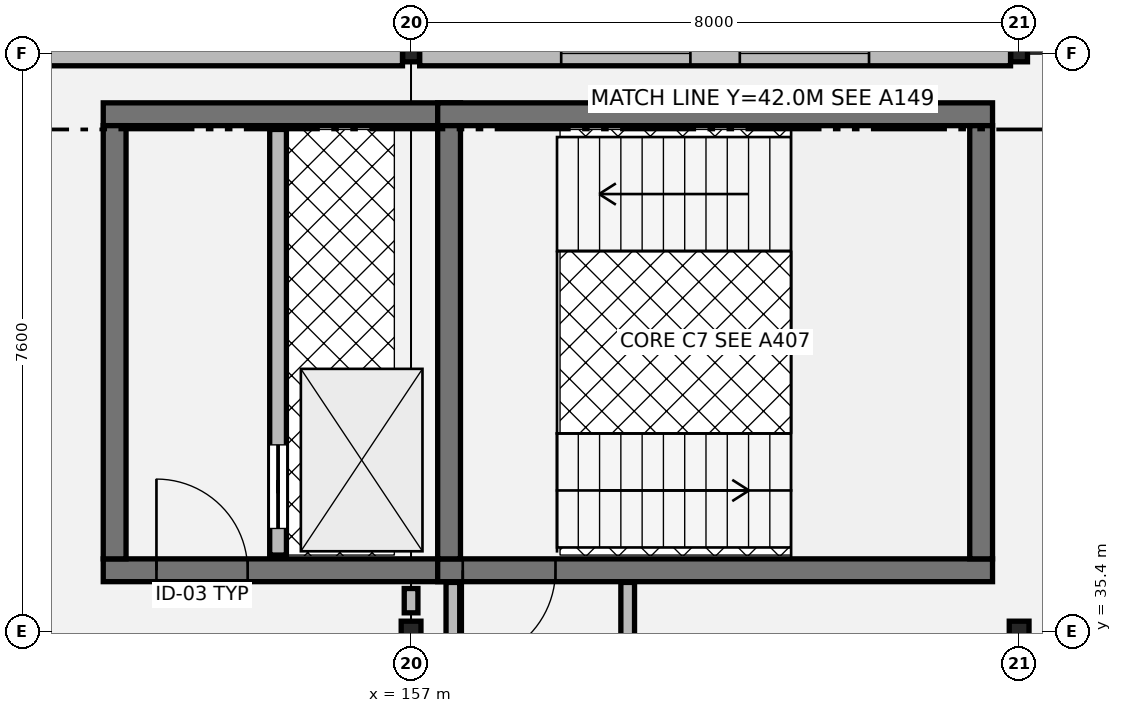
"""IFC4 building model, lengths in metres.
Left out: names, types, materials, properties, quantities, classifications, styles, units other than length and angle.
Written with IfcOpenShell. Run it as: python <this file> out.ifc"""

import sys

from ifc_helpers import new_model, si_unit, direction, frame, frame_2d, origin, origin_2d, place, context, subcontext, project, spatial, rectangle, hollow_rectangle, i_section, extrude, element, fill, save


model = new_model("IFC4")
c1 = context("Model", 3, precision=1e-05, world=origin(), true_north=direction((0.0, 1.0)))
c2 = subcontext(c1, "Body", "Model", "MODEL_VIEW")
j1 = project(units=[si_unit("LENGTHUNIT", "METRE"), si_unit("PLANEANGLEUNIT", "RADIAN")], contexts=[c1])
p1 = place(None, origin())
s1 = spatial("IfcSite", under=j1, at=p1, CompositionType="ELEMENT")
p2 = place(p1, origin())
s2 = spatial("IfcBuilding", under=s1, at=p2, CompositionType="ELEMENT")
p3 = place(p2, frame((0.0, 0.0, 13.26)))
s3 = spatial("IfcBuildingStorey", under=s2, at=p3, CompositionType="ELEMENT", Elevation=13.26)
p4 = place(p3, frame((157.0, 35.4, 0.0), z_axis=(0.0, 0.0, 1.0), x_axis=(1.0, 0.0, 0.0)))
e1 = element("IfcColumn", 1, at=p4, inside=s3, PredefinedType="COLUMN", context=c2, shape_type="SweptSolid", body=[
    extrude(i_section(OverallWidth=0.26, OverallDepth=0.26, WebThickness=0.01, FlangeThickness=0.018, at=origin_2d()), origin(), (0.0, 0.0, 1.0), 4.055),
])
p5 = place(p3, frame((157.0, 43.0, 0.0), z_axis=(0.0, 0.0, 1.0), x_axis=(1.0, 0.0, 0.0)))
e2 = element("IfcColumn", 2, at=p5, inside=s3, PredefinedType="COLUMN", context=c2, shape_type="SweptSolid", body=[
    extrude(hollow_rectangle(XDim=0.22, YDim=0.22, WallThickness=0.01, at=origin_2d()), origin(), (0.0, 0.0, 1.0), 4.055),
])
p6 = place(p3, frame((165.0, 35.4, 0.0), z_axis=(0.0, 0.0, 1.0), x_axis=(1.0, 0.0, 0.0)))
e3 = element("IfcColumn", 3, at=p6, inside=s3, PredefinedType="COLUMN", context=c2, shape_type="SweptSolid", body=[
    extrude(i_section(OverallWidth=0.26, OverallDepth=0.26, WebThickness=0.01, FlangeThickness=0.018, at=origin_2d()), origin(), (0.0, 0.0, 1.0), 4.055),
])
p7 = place(p3, frame((165.0, 43.0, 0.0), z_axis=(0.0, 0.0, 1.0), x_axis=(1.0, 0.0, 0.0)))
e4 = element("IfcColumn", 4, at=p7, inside=s3, PredefinedType="COLUMN", context=c2, shape_type="SweptSolid", body=[
    extrude(hollow_rectangle(XDim=0.22, YDim=0.22, WallThickness=0.01, at=origin_2d()), origin(), (0.0, 0.0, 1.0), 4.055),
])
p8 = place(p3, frame((164.887, 43.0, 0.0), z_axis=(0.0, 0.0, 1.0), x_axis=(-1.0, 0.0, 0.0)))
e5 = element("IfcWall", 5, at=p8, inside=s3, PredefinedType="SOLIDWALL", context=c2, shape_type="SweptSolid", body=[
    extrude(rectangle(XDim=7.774, YDim=0.325, at=frame_2d((3.887, 0.0))), origin(), (0.0, 0.0, 1.0), 3.48),
])
p9 = place(p8, frame((1.862, 0.0, 0.8)))
e6 = element("IfcOpeningElement", 6, at=p9, cuts=e5, PredefinedType="OPENING", context=c2, shape_type="SweptSolid", body=[
    extrude(rectangle(XDim=1.7, YDim=2.2, at=frame_2d((0.85, 1.1))), frame((0.0, 0.172, 0.0), z_axis=(0.0, -1.0, 0.0), x_axis=(1.0, 0.0, 0.0)), (0.0, 0.0, 1.0), 0.345),
])
p10 = place(p8, frame((4.212, 0.0, 0.8)))
e7 = element("IfcOpeningElement", 7, at=p10, cuts=e5, PredefinedType="OPENING", context=c2, shape_type="SweptSolid", body=[
    extrude(rectangle(XDim=1.7, YDim=2.2, at=frame_2d((0.85, 1.1))), frame((0.0, 0.172, 0.0), z_axis=(0.0, -1.0, 0.0), x_axis=(1.0, 0.0, 0.0)), (0.0, 0.0, 1.0), 0.345),
])
p11 = place(p3, frame((156.887, 43.0, 0.0), z_axis=(0.0, 0.0, 1.0), x_axis=(-1.0, 0.0, 0.0)))
e8 = element("IfcWall", 8, at=p11, inside=s3, PredefinedType="SOLIDWALL", context=c2, shape_type="SweptSolid", body=[
    extrude(rectangle(XDim=7.774, YDim=0.325, at=frame_2d((3.887, 0.0))), origin(), (0.0, 0.0, 1.0), 3.48),
])
p12 = place(p3, frame((152.95, 36.2, 0.0), z_axis=(0.0, 0.0, 1.0), x_axis=(1.0, 0.0, 0.0)))
e9 = element("IfcWall", 9, at=p12, inside=s3, PredefinedType="SHEAR", context=c2, shape_type="SweptSolid", body=[
    extrude(rectangle(XDim=4.7, YDim=0.3, at=frame_2d((2.35, 0.0))), origin(), (0.0, 0.0, 1.0), 3.845),
])
p13 = place(p12, frame((0.7, 0.0, 0.0)))
e10 = element("IfcOpeningElement", 10, at=p13, cuts=e9, PredefinedType="OPENING", context=c2, shape_type="SweptSolid", body=[
    extrude(rectangle(XDim=1.2, YDim=2.16, at=frame_2d((0.6, 1.08))), frame((0.0, 0.16, 0.0), z_axis=(0.0, -1.0, 0.0), x_axis=(1.0, 0.0, 0.0)), (0.0, 0.0, 1.0), 0.32),
])
p14 = place(p3, frame((157.65, 42.2, 0.0), z_axis=(0.0, 0.0, 1.0), x_axis=(-1.0, 0.0, 0.0)))
e11 = element("IfcWall", 11, at=p14, inside=s3, PredefinedType="SHEAR", context=c2, shape_type="SweptSolid", body=[
    extrude(rectangle(XDim=4.7, YDim=0.3, at=frame_2d((2.35, 0.0))), origin(), (0.0, 0.0, 1.0), 3.845),
])
p15 = place(p3, frame((153.1, 42.05, 0.0), z_axis=(0.0, 0.0, 1.0), x_axis=(0.0, -1.0, 0.0)))
e12 = element("IfcWall", 12, at=p15, inside=s3, PredefinedType="SHEAR", context=c2, shape_type="SweptSolid", body=[
    extrude(rectangle(XDim=5.7, YDim=0.3, at=frame_2d((2.85, 0.0))), origin(), (0.0, 0.0, 1.0), 3.845),
])
p16 = place(p3, frame((155.25, 36.4, 0.0), z_axis=(0.0, 0.0, 1.0), x_axis=(0.0, 1.0, 0.0)))
e13 = element("IfcWall", 13, at=p16, inside=s3, PredefinedType="SOLIDWALL", context=c2, shape_type="SweptSolid", body=[
    extrude(rectangle(XDim=5.6, YDim=0.22, at=frame_2d((2.8, 0.0))), origin(), (0.0, 0.0, 1.0), 3.845),
])
p17 = place(p16, frame((0.35, 0.0, 0.0)))
e14 = element("IfcOpeningElement", 14, at=p17, cuts=e13, PredefinedType="OPENING", context=c2, shape_type="SweptSolid", body=[
    extrude(rectangle(XDim=1.1, YDim=2.15, at=frame_2d((0.55, 1.075))), frame((0.0, 0.12, 0.0), z_axis=(0.0, -1.0, 0.0), x_axis=(1.0, 0.0, 0.0)), (0.0, 0.0, 1.0), 0.24),
])
p18 = place(p3, frame((157.35, 36.2, 0.0), z_axis=(0.0, 0.0, 1.0), x_axis=(1.0, 0.0, 0.0)))
e15 = element("IfcWall", 15, at=p18, inside=s3, PredefinedType="SHEAR", context=c2, shape_type="SweptSolid", body=[
    extrude(rectangle(XDim=7.3, YDim=0.3, at=frame_2d((3.65, 0.0))), origin(), (0.0, 0.0, 1.0), 3.845),
])
p19 = place(p18, frame((0.33, 0.0, 0.0)))
e16 = element("IfcOpeningElement", 16, at=p19, cuts=e15, PredefinedType="OPENING", context=c2, shape_type="SweptSolid", body=[
    extrude(rectangle(XDim=1.22, YDim=2.18, at=frame_2d((0.61, 1.09))), frame((0.0, 0.16, 0.0), z_axis=(0.0, -1.0, 0.0), x_axis=(1.0, 0.0, 0.0)), (0.0, 0.0, 1.0), 0.32),
])
p20 = place(p3, frame((157.35, 42.2, 0.0), z_axis=(0.0, 0.0, 1.0), x_axis=(1.0, 0.0, 0.0)))
e17 = element("IfcWall", 17, at=p20, inside=s3, PredefinedType="SHEAR", context=c2, shape_type="SweptSolid", body=[
    extrude(rectangle(XDim=7.3, YDim=0.3, at=frame_2d((3.65, 0.0))), origin(), (0.0, 0.0, 1.0), 3.845),
])
for number, where, z_axis, x_axis in (
    (18, (157.5, 36.35, 0.0), (0.0, 0.0, 1.0), (0.0, 1.0, 0.0)),
    (19, (164.5, 36.35, 0.0), (0.0, 0.0, 1.0), (0.0, 1.0, 0.0)),
):
    element("IfcWall", number, at=place(p3, frame(where, z_axis=z_axis, x_axis=x_axis)), inside=s3, PredefinedType="SHEAR", context=c2, shape_type="SweptSolid", body=[
        extrude(rectangle(XDim=5.7, YDim=0.3, at=frame_2d((2.85, 0.0))), origin(), (0.0, 0.0, 1.0), 3.845),
    ])
p21 = place(p3, frame((157.0, 35.64, 0.0), z_axis=(0.0, 0.0, 1.0), x_axis=(0.0, 1.0, 0.0)))
e20 = element("IfcWall", 20, at=p21, inside=s3, PredefinedType="PARTITIONING", context=c2, shape_type="SweptSolid", body=[
    extrude(rectangle(XDim=0.32, YDim=0.18, at=frame_2d((0.16, 0.0))), origin(), (0.0, 0.0, 1.0), 3.18),
])
for number, where, z_axis, x_axis in (
    (21, (157.55, 11.96, 0.0), (0.0, 0.0, 1.0), (0.0, 1.0, 0.0)),
    (22, (159.85, 11.96, 0.0), (0.0, 0.0, 1.0), (0.0, 1.0, 0.0)),
):
    element("IfcWall", number, at=place(p3, frame(where, z_axis=z_axis, x_axis=x_axis)), inside=s3, PredefinedType="PARTITIONING", context=c2, shape_type="SweptSolid", body=[
        extrude(rectangle(XDim=24.08, YDim=0.18, at=frame_2d((12.04, 0.0))), origin(), (0.0, 0.0, 1.0), 3.18),
    ])
p22 = place(p9, origin())
e23 = element("IfcWindow", 23, at=p22, inside=s3, PartitioningType="SINGLE_PANEL", PredefinedType="WINDOW", context=c2, shape_type="SweptSolid", body=[
    extrude(rectangle(XDim=1.7, YDim=2.2, at=frame_2d((0.85, 1.1))), frame((0.0, 0.03, 0.0), z_axis=(0.0, -1.0, 0.0), x_axis=(1.0, 0.0, 0.0)), (0.0, 0.0, 1.0), 0.06),
])
fill(e6, e23)
p23 = place(p10, origin())
e24 = element("IfcWindow", 24, at=p23, inside=s3, PartitioningType="SINGLE_PANEL", PredefinedType="WINDOW", context=c2, shape_type="SweptSolid", body=[
    extrude(rectangle(XDim=1.7, YDim=2.2, at=frame_2d((0.85, 1.1))), frame((0.0, 0.03, 0.0), z_axis=(0.0, -1.0, 0.0), x_axis=(1.0, 0.0, 0.0)), (0.0, 0.0, 1.0), 0.06),
])
fill(e7, e24)
p24 = place(p13, origin())
e25 = element("IfcDoor", 25, at=p24, inside=s3, OperationType="SINGLE_SWING_LEFT", PredefinedType="DOOR", context=c2, shape_type="SweptSolid", body=[
    extrude(rectangle(XDim=1.2, YDim=2.16, at=frame_2d((0.6, 1.08))), frame((0.0, 0.025, 0.0), z_axis=(0.0, -1.0, 0.0), x_axis=(1.0, 0.0, 0.0)), (0.0, 0.0, 1.0), 0.05),
])
fill(e10, e25)
p25 = place(p17, origin())
e26 = element("IfcDoor", 26, at=p25, inside=s3, OperationType="SLIDING_TO_LEFT", PredefinedType="DOOR", context=c2, shape_type="SweptSolid", body=[
    extrude(rectangle(XDim=1.1, YDim=2.15, at=frame_2d((0.55, 1.075))), frame((0.0, 0.025, 0.0), z_axis=(0.0, -1.0, 0.0), x_axis=(1.0, 0.0, 0.0)), (0.0, 0.0, 1.0), 0.05),
])
fill(e14, e26)
p26 = place(p19, origin())
e27 = element("IfcDoor", 27, at=p26, inside=s3, OperationType="SINGLE_SWING_RIGHT", PredefinedType="DOOR", context=c2, shape_type="SweptSolid", body=[
    extrude(rectangle(XDim=1.22, YDim=2.18, at=frame_2d((0.61, 1.09))), frame((0.0, 0.025, 0.0), z_axis=(0.0, -1.0, 0.0), x_axis=(1.0, 0.0, 0.0)), (0.0, 0.0, 1.0), 0.05),
])
fill(e16, e27)
save(model, sys.argv[1])
